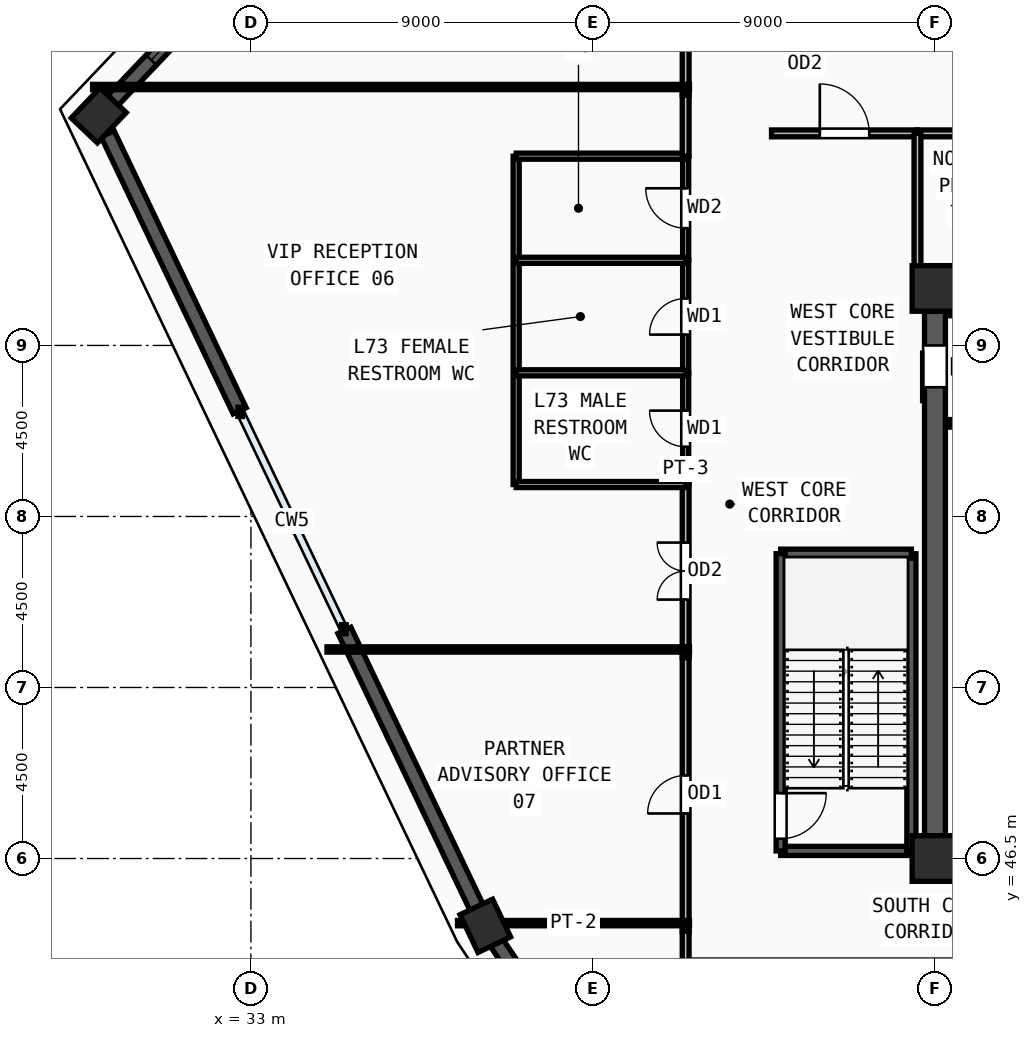
"""IFC4 building model, lengths in metres.
Left out: names, types, materials, properties, quantities, classifications, styles, units other than length and angle.
Written with IfcOpenShell. Run it as: python <this file> out.ifc"""

import sys

from ifc_helpers import new_model, si_unit, direction, frame, frame_2d, origin, origin_2d, place, context, subcontext, project, spatial, rectangle, extrude, source, transform, mapped, element, fill, save


model = new_model("IFC4")
c1 = context("Model", 3, precision=1e-05, world=origin(), true_north=direction((0.0, 1.0)))
c2 = subcontext(c1, "Body", "Model", "MODEL_VIEW")
j1 = project(units=[si_unit("LENGTHUNIT", "METRE"), si_unit("PLANEANGLEUNIT", "RADIAN")], contexts=[c1])
p1 = place(None, origin())
s1 = spatial("IfcSite", under=j1, at=p1, CompositionType="ELEMENT")
p2 = place(p1, origin())
s2 = spatial("IfcBuilding", under=s1, at=p2, CompositionType="ELEMENT")
p3 = place(p2, frame((0.0, 0.0, 282.0)))
s3 = spatial("IfcBuildingStorey", under=s2, at=p3, CompositionType="ELEMENT", Elevation=282.0)
m1 = source(origin(), c2, "Body", "SweptSolid", [
    extrude(rectangle(XDim=1.2, YDim=1.2, at=origin_2d()), origin(), (0.0, 0.0, 1.0), 4.5),
])
for number, where, z_axis, x_axis in (
    (1, (51.0, 46.5, 0.0), (0.0, 0.0, 1.0), (1.0, 0.0, 0.0)),
    (2, (51.0, 61.5, 0.0), (0.0, 0.0, 1.0), (1.0, 0.0, 0.0)),
):
    element("IfcColumn", number, at=place(p3, frame(where, z_axis=z_axis, x_axis=x_axis)), inside=s3, PredefinedType="COLUMN", context=c2, shape_type="MappedRepresentation", body=[
        mapped(m1, transform((0.0, 0.0, 0.0), x_axis=(1.0, 0.0, 0.0), y_axis=(0.0, 1.0, 0.0), z_axis=(0.0, 0.0, 1.0), scale=1.0)),
    ])
m2 = source(origin(), c2, "Body", "SweptSolid", [
    extrude(rectangle(XDim=1.1, YDim=0.95, at=origin_2d()), origin(), (0.0, 0.0, 1.0), 4.5),
])
for number, where, z_axis, x_axis in (
    (3, (39.168, 44.729, 0.0), (0.0, 0.0, 1.0), (-0.431, 0.903, 0.0)),
    (4, (28.996, 66.056, 0.0), (0.0, 0.0, 1.0), (0.689, 0.724, 0.0)),
):
    element("IfcColumn", number, at=place(p3, frame(where, z_axis=z_axis, x_axis=x_axis)), inside=s3, PredefinedType="COLUMN", context=c2, shape_type="MappedRepresentation", body=[
        mapped(m2, transform((0.0, 0.0, 0.0), x_axis=(1.0, 0.0, 0.0), y_axis=(0.0, 1.0, 0.0), z_axis=(0.0, 0.0, 1.0), scale=1.0)),
    ])
p4 = place(p3, frame((32.213, 69.437, 0.0), z_axis=(0.0, 0.0, 1.0), x_axis=(-0.689319799557, -0.724457185718, 0.0)))
e5 = element("IfcWall", 5, at=p4, inside=s3, PredefinedType="SOLIDWALL", context=c2, shape_type="SweptSolid", body=[
    extrude(rectangle(XDim=4.127, YDim=0.38, at=frame_2d((2.063, 0.0))), origin(), (0.0, 0.0, 1.0), 4.32),
])
m3 = source(origin(), c2, "Body", "SweptSolid", [
    extrude(rectangle(XDim=1.2, YDim=1.9, at=frame_2d((0.6, 0.95))), frame((0.0, 0.2, 0.0), z_axis=(0.0, -1.0, 0.0), x_axis=(1.0, 0.0, 0.0)), (0.0, 0.0, 1.0), 0.4),
])
p5 = place(p4, frame((1.464, 0.0, 0.55)))
e6 = element("IfcOpeningElement", 6, at=p5, cuts=e5, PredefinedType="OPENING", context=c2, shape_type="MappedRepresentation", body=[
    mapped(m3, transform((0.0, 0.0, 0.0), x_axis=(1.0, 0.0, 0.0), y_axis=(0.0, 1.0, 0.0), z_axis=(0.0, 0.0, 1.0), scale=1.0)),
])
p6 = place(p3, frame((29.228, 65.569, 0.0), z_axis=(0.0, 0.0, 1.0), x_axis=(0.430494504743, -0.902593198172, 0.0)))
e7 = element("IfcWall", 7, at=p6, inside=s3, PredefinedType="SOLIDWALL", context=c2, shape_type="SweptSolid", body=[
    extrude(rectangle(XDim=8.075, YDim=0.38, at=frame_2d((4.037, 0.0))), origin(), (0.0, 0.0, 1.0), 4.32),
])
p7 = place(p3, frame((35.46, 52.504, 0.0), z_axis=(0.0, 0.0, 1.0), x_axis=(0.430506253415, -0.902587594514, 0.0)))
e8 = element("IfcWall", 8, at=p7, inside=s3, PredefinedType="SOLIDWALL", context=c2, shape_type="SweptSolid", body=[
    extrude(rectangle(XDim=8.074, YDim=0.38, at=frame_2d((4.037, 0.0))), origin(), (0.0, 0.0, 1.0), 4.32),
])
p8 = place(p3, frame((39.468, 44.28, 0.0), z_axis=(0.0, 0.0, 1.0), x_axis=(0.555734273121, -0.831359980801, 0.0)))
e9 = element("IfcWall", 9, at=p8, inside=s3, PredefinedType="SOLIDWALL", context=c2, shape_type="SweptSolid", body=[
    extrude(rectangle(XDim=10.457, YDim=0.38, at=frame_2d((5.228, 0.0))), origin(), (0.0, 0.0, 1.0), 4.32),
])
p9 = place(p3, frame((51.0, 47.1, 0.0), z_axis=(0.0, 0.0, 1.0), x_axis=(0.0, 1.0, 0.0)))
e10 = element("IfcWall", 10, at=p9, inside=s3, PredefinedType="SHEAR", context=c2, shape_type="SweptSolid", body=[
    extrude(rectangle(XDim=13.8, YDim=0.55, at=frame_2d((6.9, 0.0))), origin(), (0.0, 0.0, 1.0), 4.32),
])
m4 = source(origin(), c2, "Body", "SweptSolid", [
    extrude(rectangle(XDim=1.1, YDim=2.2, at=frame_2d((0.55, 1.1))), frame((0.0, 0.285, 0.0), z_axis=(0.0, -1.0, 0.0), x_axis=(1.0, 0.0, 0.0)), (0.0, 0.0, 1.0), 0.57),
])
p10 = place(p9, frame((11.8, 0.0, 0.0)))
e11 = element("IfcOpeningElement", 11, at=p10, cuts=e10, PredefinedType="OPENING", context=c2, shape_type="MappedRepresentation", body=[
    mapped(m4, transform((0.0, 0.0, 0.0), x_axis=(1.0, 0.0, 0.0), y_axis=(0.0, 1.0, 0.0), z_axis=(0.0, 0.0, 1.0), scale=1.0)),
])
p11 = place(p3, frame((46.94, 46.7, 0.0), z_axis=(0.0, 0.0, 1.0), x_axis=(1.0, 0.0, 0.0)))
e12 = element("IfcWall", 12, at=p11, inside=s3, PredefinedType="SOLIDWALL", context=c2, shape_type="SweptSolid", body=[
    extrude(rectangle(XDim=3.44, YDim=0.24, at=frame_2d((1.72, 0.0))), origin(), (0.0, 0.0, 1.0), 4.32),
])
p12 = place(p3, frame((50.38, 46.7, 0.0), z_axis=(0.0, 0.0, 1.0), x_axis=(0.0, 1.0, 0.0)))
e13 = element("IfcWall", 13, at=p12, inside=s3, PredefinedType="SOLIDWALL", context=c2, shape_type="SweptSolid", body=[
    extrude(rectangle(XDim=7.82, YDim=0.24, at=frame_2d((3.91, 0.0))), origin(), (0.0, 0.0, 1.0), 4.32),
])
p13 = place(p3, frame((50.38, 54.52, 0.0), z_axis=(0.0, 0.0, 1.0), x_axis=(-1.0, 0.0, 0.0)))
e14 = element("IfcWall", 14, at=p13, inside=s3, PredefinedType="SOLIDWALL", context=c2, shape_type="SweptSolid", body=[
    extrude(rectangle(XDim=3.44, YDim=0.24, at=frame_2d((1.72, 0.0))), origin(), (0.0, 0.0, 1.0), 4.32),
])
p14 = place(p3, frame((46.94, 54.52, 0.0), z_axis=(0.0, 0.0, 1.0), x_axis=(0.0, -1.0, 0.0)))
e15 = element("IfcWall", 15, at=p14, inside=s3, PredefinedType="SOLIDWALL", context=c2, shape_type="SweptSolid", body=[
    extrude(rectangle(XDim=7.82, YDim=0.24, at=frame_2d((3.91, 0.0))), origin(), (0.0, 0.0, 1.0), 4.32),
])
m5 = source(origin(), c2, "Body", "SweptSolid", [
    extrude(rectangle(XDim=1.2, YDim=2.2, at=frame_2d((0.6, 1.1))), frame((0.0, 0.13, 0.0), z_axis=(0.0, -1.0, 0.0), x_axis=(1.0, 0.0, 0.0)), (0.0, 0.0, 1.0), 0.26),
])
p15 = place(p14, frame((6.3, 0.0, 0.0)))
e16 = element("IfcOpeningElement", 16, at=p15, cuts=e15, PredefinedType="OPENING", context=c2, shape_type="MappedRepresentation", body=[
    mapped(m5, transform((0.0, 0.0, 0.0), x_axis=(1.0, 0.0, 0.0), y_axis=(0.0, 1.0, 0.0), z_axis=(0.0, 0.0, 1.0), scale=1.0)),
])
for number, where, z_axis, x_axis in (
    (17, (51.4, 57.95, 0.0), (0.0, 0.0, 1.0), (1.0, 0.0, 0.0)),
    (18, (53.8, 60.88, 0.0), (0.0, 0.0, 1.0), (-1.0, 0.0, 0.0)),
):
    element("IfcWall", number, at=place(p3, frame(where, z_axis=z_axis, x_axis=x_axis)), inside=s3, PredefinedType="SOLIDWALL", context=c2, shape_type="SweptSolid", body=[
        extrude(rectangle(XDim=2.4, YDim=0.2, at=frame_2d((1.2, 0.0))), origin(), (0.0, 0.0, 1.0), 4.32),
    ])
p16 = place(p3, frame((44.44, 56.34, 0.0), z_axis=(0.0, 0.0, 1.0), x_axis=(0.0, 1.0, 0.0)))
e19 = element("IfcWall", 19, at=p16, inside=s3, PredefinedType="PARTITIONING", context=c2, shape_type="SweptSolid", body=[
    extrude(rectangle(XDim=2.94, YDim=0.16, at=frame_2d((1.47, 0.0))), origin(), (0.0, 0.0, 1.0), 4.32),
])
m6 = source(origin(), c2, "Body", "SweptSolid", [
    extrude(rectangle(XDim=0.95, YDim=2.15, at=frame_2d((0.475, 1.075))), frame((0.0, 0.09, 0.0), z_axis=(0.0, -1.0, 0.0), x_axis=(1.0, 0.0, 0.0)), (0.0, 0.0, 1.0), 0.18),
])
p17 = place(p16, frame((0.995, 0.0, 0.0)))
e20 = element("IfcOpeningElement", 20, at=p17, cuts=e19, PredefinedType="OPENING", context=c2, shape_type="MappedRepresentation", body=[
    mapped(m6, transform((0.0, 0.0, 0.0), x_axis=(1.0, 0.0, 0.0), y_axis=(0.0, 1.0, 0.0), z_axis=(0.0, 0.0, 1.0), scale=1.0)),
])
p18 = place(p3, frame((44.44, 59.28, 0.0), z_axis=(0.0, 0.0, 1.0), x_axis=(0.0, 1.0, 0.0)))
e21 = element("IfcWall", 21, at=p18, inside=s3, PredefinedType="PARTITIONING", context=c2, shape_type="SweptSolid", body=[
    extrude(rectangle(XDim=2.96, YDim=0.16, at=frame_2d((1.48, 0.0))), origin(), (0.0, 0.0, 1.0), 4.32),
])
p19 = place(p18, frame((1.005, 0.0, 0.0)))
e22 = element("IfcOpeningElement", 22, at=p19, cuts=e21, PredefinedType="OPENING", context=c2, shape_type="MappedRepresentation", body=[
    mapped(m6, transform((0.0, 0.0, 0.0), x_axis=(1.0, 0.0, 0.0), y_axis=(0.0, 1.0, 0.0), z_axis=(0.0, 0.0, 1.0), scale=1.0)),
])
p20 = place(p3, frame((44.44, 62.24, 0.0), z_axis=(0.0, 0.0, 1.0), x_axis=(0.0, 1.0, 0.0)))
e23 = element("IfcWall", 23, at=p20, inside=s3, PredefinedType="PARTITIONING", context=c2, shape_type="SweptSolid", body=[
    extrude(rectangle(XDim=2.74, YDim=0.16, at=frame_2d((1.37, 0.0))), origin(), (0.0, 0.0, 1.0), 4.32),
])
m7 = source(origin(), c2, "Body", "SweptSolid", [
    extrude(rectangle(XDim=1.05, YDim=2.15, at=frame_2d((0.525, 1.075))), frame((0.0, 0.09, 0.0), z_axis=(0.0, -1.0, 0.0), x_axis=(1.0, 0.0, 0.0)), (0.0, 0.0, 1.0), 0.18),
])
p21 = place(p20, frame((0.845, 0.0, 0.0)))
e24 = element("IfcOpeningElement", 24, at=p21, cuts=e23, PredefinedType="OPENING", context=c2, shape_type="MappedRepresentation", body=[
    mapped(m7, transform((0.0, 0.0, 0.0), x_axis=(1.0, 0.0, 0.0), y_axis=(0.0, 1.0, 0.0), z_axis=(0.0, 0.0, 1.0), scale=1.0)),
])
p22 = place(p3, frame((50.54, 65.58, 0.0), z_axis=(0.0, 0.0, 1.0), x_axis=(1.0, 0.0, 0.0)))
e25 = element("IfcWall", 25, at=p22, inside=s3, PredefinedType="PARTITIONING", context=c2, shape_type="SweptSolid", body=[
    extrude(rectangle(XDim=3.87, YDim=0.18, at=frame_2d((1.935, 0.0))), origin(), (0.0, 0.0, 1.0), 4.32),
])
m8 = source(origin(), c2, "Body", "SweptSolid", [
    extrude(rectangle(XDim=1.0, YDim=2.2, at=frame_2d((0.5, 1.1))), frame((0.0, 0.1, 0.0), z_axis=(0.0, -1.0, 0.0), x_axis=(1.0, 0.0, 0.0)), (0.0, 0.0, 1.0), 0.2),
])
p23 = place(p22, frame((1.435, 0.0, 0.0)))
e26 = element("IfcOpeningElement", 26, at=p23, cuts=e25, PredefinedType="OPENING", context=c2, shape_type="MappedRepresentation", body=[
    mapped(m8, transform((0.0, 0.0, 0.0), x_axis=(1.0, 0.0, 0.0), y_axis=(0.0, 1.0, 0.0), z_axis=(0.0, 0.0, 1.0), scale=1.0)),
])
p24 = place(p3, frame((46.7, 65.58, 0.0), z_axis=(0.0, 0.0, 1.0), x_axis=(1.0, 0.0, 0.0)))
e27 = element("IfcWall", 27, at=p24, inside=s3, PredefinedType="PARTITIONING", context=c2, shape_type="SweptSolid", body=[
    extrude(rectangle(XDim=3.84, YDim=0.18, at=frame_2d((1.92, 0.0))), origin(), (0.0, 0.0, 1.0), 4.32),
])
m9 = source(origin(), c2, "Body", "SweptSolid", [
    extrude(rectangle(XDim=1.3, YDim=2.2, at=frame_2d((0.65, 1.1))), frame((0.0, 0.1, 0.0), z_axis=(0.0, -1.0, 0.0), x_axis=(1.0, 0.0, 0.0)), (0.0, 0.0, 1.0), 0.2),
])
p25 = place(p24, frame((1.27, 0.0, 0.0)))
e28 = element("IfcOpeningElement", 28, at=p25, cuts=e27, PredefinedType="OPENING", context=c2, shape_type="MappedRepresentation", body=[
    mapped(m9, transform((0.0, 0.0, 0.0), x_axis=(1.0, 0.0, 0.0), y_axis=(0.0, 1.0, 0.0), z_axis=(0.0, 0.0, 1.0), scale=1.0)),
])
p26 = place(p3, frame((44.44, 51.785, 0.0), z_axis=(0.0, 0.0, 1.0), x_axis=(0.0, 1.0, 0.0)))
e29 = element("IfcWall", 29, at=p26, inside=s3, PredefinedType="PARTITIONING", context=c2, shape_type="SweptSolid", body=[
    extrude(rectangle(XDim=4.555, YDim=0.18, at=frame_2d((2.278, 0.0))), origin(), (0.0, 0.0, 1.0), 4.011),
])
m10 = source(origin(), c2, "Body", "SweptSolid", [
    extrude(rectangle(XDim=1.5, YDim=2.2, at=frame_2d((0.75, 1.1))), frame((0.0, 0.1, 0.0), z_axis=(0.0, -1.0, 0.0), x_axis=(1.0, 0.0, 0.0)), (0.0, 0.0, 1.0), 0.2),
])
p27 = place(p26, frame((1.528, 0.0, 0.0)))
e30 = element("IfcOpeningElement", 30, at=p27, cuts=e29, PredefinedType="OPENING", context=c2, shape_type="MappedRepresentation", body=[
    mapped(m10, transform((0.0, 0.0, 0.0), x_axis=(1.0, 0.0, 0.0), y_axis=(0.0, 1.0, 0.0), z_axis=(0.0, 0.0, 1.0), scale=1.0)),
])
p28 = place(p3, frame((44.44, 44.585, 0.0), z_axis=(0.0, 0.0, 1.0), x_axis=(0.0, 1.0, 0.0)))
e31 = element("IfcWall", 31, at=p28, inside=s3, PredefinedType="PARTITIONING", context=c2, shape_type="SweptSolid", body=[
    extrude(rectangle(XDim=7.2, YDim=0.18, at=frame_2d((3.6, 0.0))), origin(), (0.0, 0.0, 1.0), 4.32),
])
p29 = place(p28, frame((3.1, 0.0, 0.0)))
e32 = element("IfcOpeningElement", 32, at=p29, cuts=e31, PredefinedType="OPENING", context=c2, shape_type="MappedRepresentation", body=[
    mapped(m8, transform((0.0, 0.0, 0.0), x_axis=(1.0, 0.0, 0.0), y_axis=(0.0, 1.0, 0.0), z_axis=(0.0, 0.0, 1.0), scale=1.0)),
])
p30 = place(p3, frame((39.98, 56.34, 0.0), z_axis=(0.0, 0.0, 1.0), x_axis=(0.0, 1.0, 0.0)))
e33 = element("IfcWall", 33, at=p30, inside=s3, PredefinedType="PARTITIONING", context=c2, shape_type="SweptSolid", body=[
    extrude(rectangle(XDim=8.64, YDim=0.16, at=frame_2d((4.32, 0.0))), origin(), (0.0, 0.0, 1.0), 4.32),
])
for number, where, z_axis, x_axis in (
    (34, (39.98, 56.34, 0.0), (0.0, 0.0, 1.0), (1.0, 0.0, 0.0)),
    (35, (39.98, 59.28, 0.0), (0.0, 0.0, 1.0), (1.0, 0.0, 0.0)),
    (36, (39.98, 62.24, 0.0), (0.0, 0.0, 1.0), (1.0, 0.0, 0.0)),
    (37, (39.98, 64.98, 0.0), (0.0, 0.0, 1.0), (1.0, 0.0, 0.0)),
):
    element("IfcWall", number, at=place(p3, frame(where, z_axis=z_axis, x_axis=x_axis)), inside=s3, PredefinedType="PARTITIONING", context=c2, shape_type="SweptSolid", body=[
        extrude(rectangle(XDim=4.46, YDim=0.16, at=frame_2d((2.23, 0.0))), origin(), (0.0, 0.0, 1.0), 4.32),
    ])
p31 = place(p3, frame((50.54, 61.95, 0.0), z_axis=(0.0, 0.0, 1.0), x_axis=(0.0, 1.0, 0.0)))
e38 = element("IfcWall", 38, at=p31, inside=s3, PredefinedType="PARTITIONING", context=c2, shape_type="SweptSolid", body=[
    extrude(rectangle(XDim=3.63, YDim=0.18, at=frame_2d((1.815, 0.0))), origin(), (0.0, 0.0, 1.0), 4.32),
])
p32 = place(p3, frame((44.44, 66.585, 0.0), z_axis=(0.0, 0.0, 1.0), x_axis=(0.0, 1.0, 0.0)))
e39 = element("IfcWall", 39, at=p32, inside=s3, PredefinedType="PARTITIONING", context=c2, shape_type="SweptSolid", body=[
    extrude(rectangle(XDim=1.395, YDim=0.18, at=frame_2d((0.698, 0.0))), origin(), (0.0, 0.0, 1.0), 4.32),
])
p33 = place(p3, frame((44.44, 64.98, 0.0), z_axis=(0.0, 0.0, 1.0), x_axis=(0.0, 1.0, 0.0)))
e40 = element("IfcWall", 40, at=p33, inside=s3, PredefinedType="PARTITIONING", context=c2, shape_type="SweptSolid", body=[
    extrude(rectangle(XDim=1.605, YDim=0.18, at=frame_2d((0.802, 0.0))), origin(), (0.0, 0.0, 1.0), 4.32),
])
p34 = place(p3, frame((44.44, 43.67, 0.0), z_axis=(0.0, 0.0, 1.0), x_axis=(0.0, 1.0, 0.0)))
e41 = element("IfcWall", 41, at=p34, inside=s3, PredefinedType="PARTITIONING", context=c2, shape_type="SweptSolid", body=[
    extrude(rectangle(XDim=0.915, YDim=0.18, at=frame_2d((0.458, 0.0))), origin(), (0.0, 0.0, 1.0), 4.32),
])
p35 = place(p3, frame((44.54, 44.8, 0.0), z_axis=(0.0, 0.0, 1.0), x_axis=(-1.0, 0.0, 0.0)))
e42 = element("IfcWall", 42, at=p35, inside=s3, PredefinedType="PARTITIONING", context=c2, shape_type="SweptSolid", body=[
    extrude(rectangle(XDim=6.104, YDim=0.14, at=frame_2d((3.052, 0.0))), origin(), (0.0, 0.0, 1.0), 4.32),
])
p36 = place(p3, frame((44.54, 52.0, 0.0), z_axis=(0.0, 0.0, 1.0), x_axis=(-1.0, 0.0, 0.0)))
e43 = element("IfcWall", 43, at=p36, inside=s3, PredefinedType="PARTITIONING", context=c2, shape_type="SweptSolid", body=[
    extrude(rectangle(XDim=9.538, YDim=0.14, at=frame_2d((4.769, 0.0))), origin(), (0.0, 0.0, 1.0), 4.32),
])
p37 = place(p3, frame((44.54, 66.8, 0.0), z_axis=(0.0, 0.0, 1.0), x_axis=(-1.0, 0.0, 0.0)))
e44 = element("IfcWall", 44, at=p37, inside=s3, PredefinedType="PARTITIONING", context=c2, shape_type="SweptSolid", body=[
    extrude(rectangle(XDim=15.706, YDim=0.14, at=frame_2d((7.853, 0.0))), origin(), (0.0, 0.0, 1.0), 4.32),
])
m11 = source(origin(), c2, "Body", "SweptSolid", [
    extrude(rectangle(XDim=1.2, YDim=1.9, at=frame_2d((0.6, 0.95))), frame((0.0, 0.03, 0.0), z_axis=(0.0, -1.0, 0.0), x_axis=(1.0, 0.0, 0.0)), (0.0, 0.0, 1.0), 0.06),
])
p38 = place(p5, origin())
e45 = element("IfcWindow", 45, at=p38, inside=s3, PartitioningType="SINGLE_PANEL", PredefinedType="WINDOW", context=c2, shape_type="MappedRepresentation", body=[
    mapped(m11, transform((0.0, 0.0, 0.0), x_axis=(1.0, 0.0, 0.0), y_axis=(0.0, 1.0, 0.0), z_axis=(0.0, 0.0, 1.0), scale=1.0)),
])
fill(e6, e45)
m12 = source(origin(), c2, "Body", "SweptSolid", [
    extrude(rectangle(XDim=1.2, YDim=2.2, at=frame_2d((0.6, 1.1))), frame((0.0, 0.025, 0.0), z_axis=(0.0, -1.0, 0.0), x_axis=(1.0, 0.0, 0.0)), (0.0, 0.0, 1.0), 0.05),
])
p39 = place(p15, origin())
e46 = element("IfcDoor", 46, at=p39, inside=s3, OperationType="SINGLE_SWING_LEFT", PredefinedType="DOOR", context=c2, shape_type="MappedRepresentation", body=[
    mapped(m12, transform((0.0, 0.0, 0.0), x_axis=(1.0, 0.0, 0.0), y_axis=(0.0, 1.0, 0.0), z_axis=(0.0, 0.0, 1.0), scale=1.0)),
])
fill(e16, e46)
m13 = source(origin(), c2, "Body", "SweptSolid", [
    extrude(rectangle(XDim=1.1, YDim=2.2, at=frame_2d((0.55, 1.1))), frame((0.0, 0.025, 0.0), z_axis=(0.0, -1.0, 0.0), x_axis=(1.0, 0.0, 0.0)), (0.0, 0.0, 1.0), 0.05),
])
p40 = place(p10, origin())
e47 = element("IfcDoor", 47, at=p40, inside=s3, OperationType="SLIDING_TO_LEFT", PredefinedType="DOOR", context=c2, shape_type="MappedRepresentation", body=[
    mapped(m13, transform((0.0, 0.0, 0.0), x_axis=(1.0, 0.0, 0.0), y_axis=(0.0, 1.0, 0.0), z_axis=(0.0, 0.0, 1.0), scale=1.0)),
])
fill(e11, e47)
m14 = source(origin(), c2, "Body", "SweptSolid", [
    extrude(rectangle(XDim=0.95, YDim=2.15, at=frame_2d((0.475, 1.075))), frame((0.0, 0.025, 0.0), z_axis=(0.0, -1.0, 0.0), x_axis=(1.0, 0.0, 0.0)), (0.0, 0.0, 1.0), 0.05),
])
p41 = place(p17, origin())
e48 = element("IfcDoor", 48, at=p41, inside=s3, OperationType="SINGLE_SWING_RIGHT", PredefinedType="DOOR", context=c2, shape_type="MappedRepresentation", body=[
    mapped(m14, transform((0.0, 0.0, 0.0), x_axis=(1.0, 0.0, 0.0), y_axis=(0.0, 1.0, 0.0), z_axis=(0.0, 0.0, 1.0), scale=1.0)),
])
fill(e20, e48)
p42 = place(p19, origin())
e49 = element("IfcDoor", 49, at=p42, inside=s3, OperationType="SINGLE_SWING_LEFT", PredefinedType="DOOR", context=c2, shape_type="MappedRepresentation", body=[
    mapped(m14, transform((0.0, 0.0, 0.0), x_axis=(1.0, 0.0, 0.0), y_axis=(0.0, 1.0, 0.0), z_axis=(0.0, 0.0, 1.0), scale=1.0)),
])
fill(e22, e49)
m15 = source(origin(), c2, "Body", "SweptSolid", [
    extrude(rectangle(XDim=1.05, YDim=2.15, at=frame_2d((0.525, 1.075))), frame((0.0, 0.025, 0.0), z_axis=(0.0, -1.0, 0.0), x_axis=(1.0, 0.0, 0.0)), (0.0, 0.0, 1.0), 0.05),
])
p43 = place(p21, origin())
e50 = element("IfcDoor", 50, at=p43, inside=s3, OperationType="SINGLE_SWING_RIGHT", PredefinedType="DOOR", context=c2, shape_type="MappedRepresentation", body=[
    mapped(m15, transform((0.0, 0.0, 0.0), x_axis=(1.0, 0.0, 0.0), y_axis=(0.0, 1.0, 0.0), z_axis=(0.0, 0.0, 1.0), scale=1.0)),
])
fill(e24, e50)
m16 = source(origin(), c2, "Body", "SweptSolid", [
    extrude(rectangle(XDim=1.3, YDim=2.2, at=frame_2d((0.65, 1.1))), frame((0.0, 0.025, 0.0), z_axis=(0.0, -1.0, 0.0), x_axis=(1.0, 0.0, 0.0)), (0.0, 0.0, 1.0), 0.05),
])
p44 = place(p25, origin())
e51 = element("IfcDoor", 51, at=p44, inside=s3, OperationType="SINGLE_SWING_LEFT", PredefinedType="DOOR", context=c2, shape_type="MappedRepresentation", body=[
    mapped(m16, transform((0.0, 0.0, 0.0), x_axis=(1.0, 0.0, 0.0), y_axis=(0.0, 1.0, 0.0), z_axis=(0.0, 0.0, 1.0), scale=1.0)),
])
fill(e28, e51)
m17 = source(origin(), c2, "Body", "SweptSolid", [
    extrude(rectangle(XDim=1.5, YDim=2.2, at=frame_2d((0.75, 1.1))), frame((0.0, 0.025, 0.0), z_axis=(0.0, -1.0, 0.0), x_axis=(1.0, 0.0, 0.0)), (0.0, 0.0, 1.0), 0.05),
])
p45 = place(p27, origin())
e52 = element("IfcDoor", 52, at=p45, inside=s3, OperationType="DOUBLE_DOOR_SINGLE_SWING", PredefinedType="DOOR", context=c2, shape_type="MappedRepresentation", body=[
    mapped(m17, transform((0.0, 0.0, 0.0), x_axis=(1.0, 0.0, 0.0), y_axis=(0.0, 1.0, 0.0), z_axis=(0.0, 0.0, 1.0), scale=1.0)),
])
fill(e30, e52)
m18 = source(origin(), c2, "Body", "SweptSolid", [
    extrude(rectangle(XDim=1.0, YDim=2.2, at=frame_2d((0.5, 1.1))), frame((0.0, 0.025, 0.0), z_axis=(0.0, -1.0, 0.0), x_axis=(1.0, 0.0, 0.0)), (0.0, 0.0, 1.0), 0.05),
])
p46 = place(p29, origin())
e53 = element("IfcDoor", 53, at=p46, inside=s3, OperationType="SINGLE_SWING_LEFT", PredefinedType="DOOR", context=c2, shape_type="MappedRepresentation", body=[
    mapped(m18, transform((0.0, 0.0, 0.0), x_axis=(1.0, 0.0, 0.0), y_axis=(0.0, 1.0, 0.0), z_axis=(0.0, 0.0, 1.0), scale=1.0)),
])
fill(e32, e53)
save(model, sys.argv[1])
